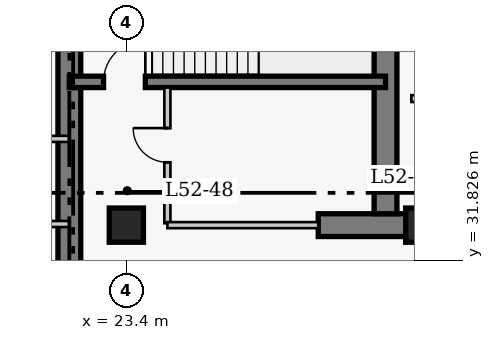
"""IFC4 building model, lengths in metres.
Left out: names, types, materials, properties, quantities, classifications, styles, units other than length and angle.
Written with IfcOpenShell. Run it as: python <this file> out.ifc"""

import sys

from ifc_helpers import new_model, si_unit, direction, frame, frame_2d, origin, origin_2d, place, context, subcontext, project, spatial, rectangle, extrude, element, fill, save


model = new_model("IFC4")
c1 = context("Model", 3, precision=1e-05, world=origin(), true_north=direction((0.0, 1.0)))
c2 = subcontext(c1, "Body", "Model", "MODEL_VIEW")
j1 = project(units=[si_unit("LENGTHUNIT", "METRE"), si_unit("PLANEANGLEUNIT", "RADIAN")], contexts=[c1])
p1 = place(None, origin())
s1 = spatial("IfcSite", under=j1, at=p1, CompositionType="ELEMENT")
p2 = place(p1, origin())
s2 = spatial("IfcBuilding", under=s1, at=p2, CompositionType="ELEMENT")
p3 = place(p2, frame((0.0, 0.0, 208.5)))
s3 = spatial("IfcBuildingStorey", under=s2, at=p3, CompositionType="ELEMENT", Elevation=208.5)
p4 = place(p3, frame((21.9, 27.05, 0.0), z_axis=(0.0, 0.0, 1.0), x_axis=(0.0, 1.0, 0.0)))
e1 = element("IfcWall", 1, at=p4, inside=s3, PredefinedType="SHEAR", context=c2, shape_type="SweptSolid", body=[
    extrude(rectangle(XDim=13.57, YDim=0.6, at=frame_2d((6.785, 0.0))), origin(), (0.0, 0.0, 1.0), 3.9),
])
p5 = place(p3, frame((28.45, 32.75, 0.0), z_axis=(0.0, 0.0, 1.0), x_axis=(1.0, 0.0, 0.0)))
e2 = element("IfcWall", 2, at=p5, inside=s3, PredefinedType="SHEAR", context=c2, shape_type="SweptSolid", body=[
    extrude(rectangle(XDim=2.4, YDim=0.6, at=frame_2d((1.2, 0.0))), origin(), (0.0, 0.0, 1.0), 3.9),
])
p6 = place(p3, frame((30.22, 33.05, 0.0), z_axis=(0.0, 0.0, 1.0), x_axis=(0.0, 1.0, 0.0)))
e3 = element("IfcWall", 3, at=p6, inside=s3, PredefinedType="SHEAR", context=c2, shape_type="SweptSolid", body=[
    extrude(rectangle(XDim=7.27, YDim=0.6, at=frame_2d((3.635, 0.0))), origin(), (0.0, 0.0, 1.0), 3.9),
])
p7 = place(p3, frame((21.9, 36.52, 0.0), z_axis=(0.0, 0.0, 1.0), x_axis=(1.0, 0.0, 0.0)))
e4 = element("IfcWall", 4, at=p7, inside=s3, PredefinedType="SHEAR", context=c2, shape_type="SweptSolid", body=[
    extrude(rectangle(XDim=8.32, YDim=0.3, at=frame_2d((4.16, 0.0))), origin(), (0.0, 0.0, 1.0), 3.9),
])
p8 = place(p7, frame((0.9, 0.0, 0.0)))
e5 = element("IfcOpeningElement", 5, at=p8, cuts=e4, PredefinedType="OPENING", context=c2, shape_type="SweptSolid", body=[
    extrude(rectangle(XDim=1.1, YDim=2.15, at=frame_2d((0.55, 1.075))), frame((0.0, 0.16, 0.0), z_axis=(0.0, -1.0, 0.0), x_axis=(1.0, 0.0, 0.0)), (0.0, 0.0, 1.0), 0.32),
])
for number, where, z_axis, x_axis in (
    (6, (23.4, 32.75, 0.0), (0.0, 0.0, 1.0), (1.0, 0.0, 0.0)),
    (7, (31.2, 32.75, 0.0), (0.0, 0.0, 1.0), (1.0, 0.0, 0.0)),
):
    element("IfcColumn", number, at=place(p3, frame(where, z_axis=z_axis, x_axis=x_axis)), inside=s3, PredefinedType="COLUMN", context=c2, shape_type="SweptSolid", body=[
        extrude(rectangle(XDim=0.9, YDim=0.9, at=origin_2d()), origin(), (0.0, 0.0, 1.0), 3.9),
    ])
p9 = place(p3, frame((30.9, 36.08, 0.0), z_axis=(0.0, 0.0, 1.0), x_axis=(1.0, 0.0, 0.0)))
e8 = element("IfcWall", 8, at=p9, inside=s3, PredefinedType="PARTITIONING", context=c2, shape_type="SweptSolid", body=[
    extrude(rectangle(XDim=1.85, YDim=0.18, at=frame_2d((0.925, 0.0))), origin(), (0.0, 0.0, 1.0), 3.65),
])
p10 = place(p9, frame((0.48, 0.0, 0.0)))
e9 = element("IfcOpeningElement", 9, at=p10, cuts=e8, PredefinedType="OPENING", context=c2, shape_type="SweptSolid", body=[
    extrude(rectangle(XDim=0.9, YDim=2.15, at=frame_2d((0.45, 1.075))), frame((0.0, 0.1, 0.0), z_axis=(0.0, -1.0, 0.0), x_axis=(1.0, 0.0, 0.0)), (0.0, 0.0, 1.0), 0.2),
])
p11 = place(p3, frame((24.48, 32.8, 0.0), z_axis=(0.0, 0.0, 1.0), x_axis=(0.0, 1.0, 0.0)))
e10 = element("IfcWall", 10, at=p11, inside=s3, PredefinedType="PARTITIONING", context=c2, shape_type="SweptSolid", body=[
    extrude(rectangle(XDim=3.57, YDim=0.16, at=frame_2d((1.785, 0.0))), origin(), (0.0, 0.0, 1.0), 3.65),
])
p12 = place(p11, frame((1.604, 0.0, 0.0)))
e11 = element("IfcOpeningElement", 11, at=p12, cuts=e10, PredefinedType="OPENING", context=c2, shape_type="SweptSolid", body=[
    extrude(rectangle(XDim=0.9, YDim=2.1, at=frame_2d((0.45, 1.05))), frame((0.0, 0.09, 0.0), z_axis=(0.0, -1.0, 0.0), x_axis=(1.0, 0.0, 0.0)), (0.0, 0.0, 1.0), 0.18),
])
p13 = place(p3, frame((24.48, 32.75, 0.0), z_axis=(0.0, 0.0, 1.0), x_axis=(1.0, 0.0, 0.0)))
e12 = element("IfcWall", 12, at=p13, inside=s3, PredefinedType="PARTITIONING", context=c2, shape_type="SweptSolid", body=[
    extrude(rectangle(XDim=3.97, YDim=0.16, at=frame_2d((1.985, 0.0))), origin(), (0.0, 0.0, 1.0), 3.65),
])
for number, where, z_axis, x_axis in (
    (13, (19.16, 35.02, 0.0), (0.0, 0.0, 1.0), (1.0, 0.0, 0.0)),
    (14, (19.16, 32.78, 0.0), (0.0, 0.0, 1.0), (1.0, 0.0, 0.0)),
):
    element("IfcWall", number, at=place(p3, frame(where, z_axis=z_axis, x_axis=x_axis)), inside=s3, PredefinedType="PARTITIONING", context=c2, shape_type="SweptSolid", body=[
        extrude(rectangle(XDim=2.74, YDim=0.16, at=frame_2d((1.37, 0.0))), origin(), (0.0, 0.0, 1.0), 3.65),
    ])
p14 = place(p12, origin())
e15 = element("IfcDoor", 15, at=p14, inside=s3, OperationType="SINGLE_SWING_RIGHT", PredefinedType="DOOR", context=c2, shape_type="SweptSolid", body=[
    extrude(rectangle(XDim=0.9, YDim=2.1, at=frame_2d((0.45, 1.05))), frame((0.0, 0.025, 0.0), z_axis=(0.0, -1.0, 0.0), x_axis=(1.0, 0.0, 0.0)), (0.0, 0.0, 1.0), 0.05),
])
fill(e11, e15)
p15 = place(p8, origin())
e16 = element("IfcDoor", 16, at=p15, inside=s3, OperationType="SINGLE_SWING_RIGHT", PredefinedType="DOOR", context=c2, shape_type="SweptSolid", body=[
    extrude(rectangle(XDim=1.1, YDim=2.15, at=frame_2d((0.55, 1.075))), frame((0.0, 0.025, 0.0), z_axis=(0.0, -1.0, 0.0), x_axis=(1.0, 0.0, 0.0)), (0.0, 0.0, 1.0), 0.05),
])
fill(e5, e16)
save(model, sys.argv[1])
